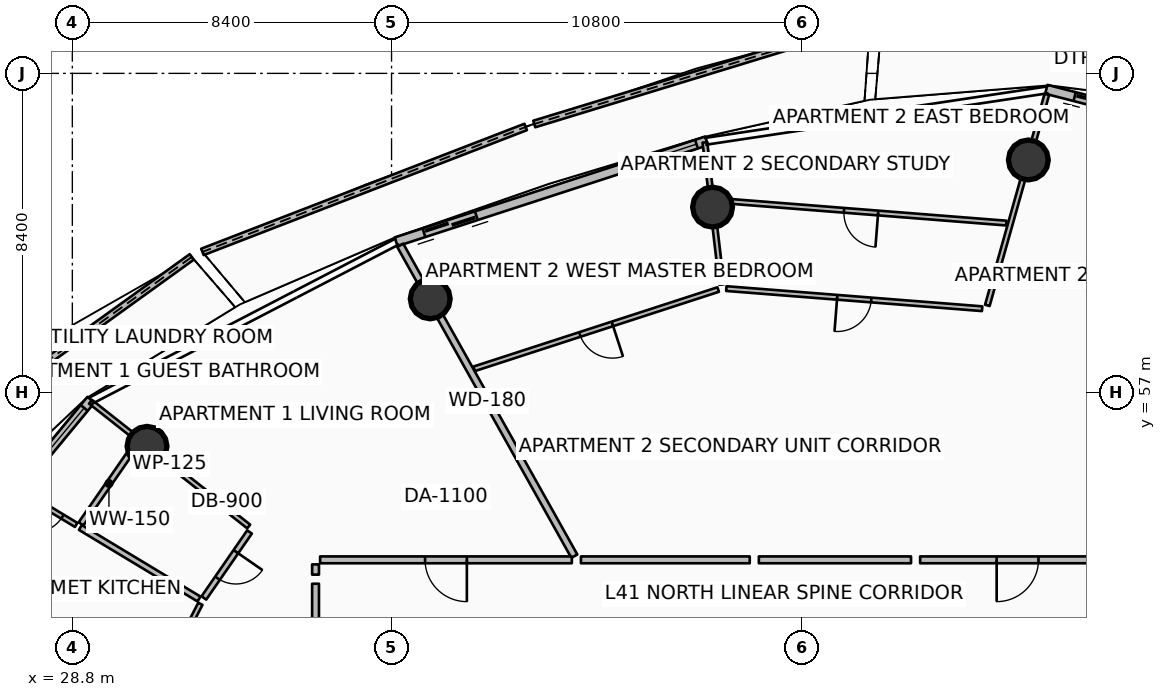
"""IFC4 building model, lengths in metres.
Left out: names, types, materials, properties, quantities, classifications, styles, units other than length and angle.
Written with IfcOpenShell. Run it as: python <this file> out.ifc"""

import sys

from ifc_helpers import new_model, si_unit, direction, frame, frame_2d, origin, origin_2d, place, context, subcontext, project, spatial, polyline, rectangle, circle, outline, extrude, element, fill, save


model = new_model("IFC4")
c1 = context("Model", 3, precision=1e-05, world=origin(), true_north=direction((0.0, 1.0)))
c2 = subcontext(c1, "Body", "Model", "MODEL_VIEW")
j1 = project(units=[si_unit("LENGTHUNIT", "METRE"), si_unit("PLANEANGLEUNIT", "RADIAN")], contexts=[c1])
p1 = place(None, origin())
s1 = spatial("IfcSite", under=j1, at=p1, CompositionType="ELEMENT")
p2 = place(p1, origin())
s2 = spatial("IfcBuilding", under=s1, at=p2, CompositionType="ELEMENT")
p3 = place(p2, frame((0.0, 0.0, 165.3)))
s3 = spatial("IfcBuildingStorey", under=s2, at=p3, CompositionType="ELEMENT", Elevation=165.3)
for number, where, z_axis, x_axis in (
    (1, (53.957, 63.122, 0.0), (0.0, 0.0, 1.0), (1.0, 0.0, 0.0)),
    (2, (45.647, 61.881, 0.0), (0.0, 0.0, 1.0), (1.0, 0.0, 0.0)),
    (3, (38.218, 59.467, 0.0), (0.0, 0.0, 1.0), (1.0, 0.0, 0.0)),
    (4, (30.766, 55.586, 0.0), (0.0, 0.0, 1.0), (1.0, 0.0, 0.0)),
):
    element("IfcColumn", number, at=place(p3, frame(where, z_axis=z_axis, x_axis=x_axis)), inside=s3, PredefinedType="COLUMN", context=c2, shape_type="SweptSolid", body=[
        extrude(circle(Radius=0.525, at=origin_2d()), origin(), (0.0, 0.0, 1.0), 3.5),
    ])
p4 = place(p3, frame((49.797, 66.768, 0.0), z_axis=(0.0, 0.0, 1.0), x_axis=(-0.956413465024, -0.292015896691, 0.0)))
e5 = element("IfcWall", 5, at=p4, inside=s3, PredefinedType="PARAPET", context=c2, shape_type="SweptSolid", body=[
    extrude(outline(polyline([(0.0, 0.0), (9.244, 0.0), (9.244, 1.148), (4.622, 1.284), (0.0, 1.483), (0.0, 0.0)])), frame((0.0, 0.09, 0.0), z_axis=(0.0, -1.0, 0.0), x_axis=(1.0, 0.0, 0.0)), (0.0, 0.0, 1.0), 0.18),
])
p5 = place(p3, frame((40.729, 63.99, 0.0), z_axis=(0.0, 0.0, 1.0), x_axis=(-0.932748827034, -0.360526872322, 0.0)))
e6 = element("IfcWall", 6, at=p5, inside=s3, PredefinedType="PARAPET", context=c2, shape_type="SweptSolid", body=[
    extrude(outline(polyline([(0.0, 0.0), (9.119, 0.0), (9.119, 1.224), (4.56, 1.127), (0.0, 1.148), (0.0, 0.0)])), frame((0.0, 0.09, 0.0), z_axis=(0.0, -1.0, 0.0), x_axis=(1.0, 0.0, 0.0)), (0.0, 0.0, 1.0), 0.18),
])
p6 = place(p3, frame((31.942, 60.57, 0.0), z_axis=(0.0, 0.0, 1.0), x_axis=(-0.811363748486, -0.584541587608, 0.0)))
e7 = element("IfcWall", 7, at=p6, inside=s3, PredefinedType="PARAPET", context=c2, shape_type="SweptSolid", body=[
    extrude(outline(polyline([(0.0, 0.0), (10.29, 0.0), (10.29, 1.632), (5.145, 1.418), (0.0, 1.233), (0.0, 0.0)])), frame((0.0, 0.09, 0.0), z_axis=(0.0, -1.0, 0.0), x_axis=(1.0, 0.0, 0.0)), (0.0, 0.0, 1.0), 0.18),
])
p7 = place(p3, frame((64.192, 62.466, 0.0), z_axis=(0.0, 0.0, 1.0), x_axis=(-0.968379685126, 0.249481032214, 0.0)))
e8 = element("IfcWall", 8, at=p7, inside=s3, PredefinedType="SOLIDWALL", context=c2, shape_type="SweptSolid", body=[
    extrude(rectangle(XDim=10.082, YDim=0.24, at=frame_2d((5.041, 0.0))), origin(), (0.0, 0.0, 1.0), 2.45),
])
p8 = place(p7, frame((7.862, 0.0, 0.0)))
e9 = element("IfcOpeningElement", 9, at=p8, cuts=e8, PredefinedType="OPENING", context=c2, shape_type="SweptSolid", body=[
    extrude(rectangle(XDim=1.45, YDim=2.15, at=frame_2d((0.725, 1.075))), frame((0.0, 0.13, 0.0), z_axis=(0.0, -1.0, 0.0), x_axis=(1.0, 0.0, 0.0)), (0.0, 0.0, 1.0), 0.26),
])
p9 = place(p7, frame((0.28, 0.0, 0.65)))
e10 = element("IfcOpeningElement", 10, at=p9, cuts=e8, PredefinedType="OPENING", context=c2, shape_type="SweptSolid", body=[
    extrude(rectangle(XDim=1.6, YDim=1.5, at=frame_2d((0.8, 0.75))), frame((0.0, 0.13, 0.0), z_axis=(0.0, -1.0, 0.0), x_axis=(1.0, 0.0, 0.0)), (0.0, 0.0, 1.0), 0.26),
])
p10 = place(p3, frame((45.49, 63.624, 0.0), z_axis=(0.0, 0.0, 1.0), x_axis=(-0.951046390632, -0.309048156224, 0.0)))
e11 = element("IfcWall", 11, at=p10, inside=s3, PredefinedType="SOLIDWALL", context=c2, shape_type="SweptSolid", body=[
    extrude(rectangle(XDim=8.59, YDim=0.24, at=frame_2d((4.295, 0.0))), origin(), (0.0, 0.0, 1.0), 2.45),
])
p11 = place(p10, frame((6.37, 0.0, 0.0)))
e12 = element("IfcOpeningElement", 12, at=p11, cuts=e11, PredefinedType="OPENING", context=c2, shape_type="SweptSolid", body=[
    extrude(rectangle(XDim=1.45, YDim=2.15, at=frame_2d((0.725, 1.075))), frame((0.0, 0.13, 0.0), z_axis=(0.0, -1.0, 0.0), x_axis=(1.0, 0.0, 0.0)), (0.0, 0.0, 1.0), 0.26),
])
p12 = place(p10, frame((0.28, 0.0, 0.65)))
e13 = element("IfcOpeningElement", 13, at=p12, cuts=e11, PredefinedType="OPENING", context=c2, shape_type="SweptSolid", body=[
    extrude(rectangle(XDim=1.6, YDim=1.5, at=frame_2d((0.8, 0.75))), frame((0.0, 0.13, 0.0), z_axis=(0.0, -1.0, 0.0), x_axis=(1.0, 0.0, 0.0)), (0.0, 0.0, 1.0), 0.26),
])
p13 = place(p3, frame((29.291, 56.813, 0.0), z_axis=(0.0, 0.0, 1.0), x_axis=(-0.636771922292, -0.77105221547, 0.0)))
e14 = element("IfcWall", 14, at=p13, inside=s3, PredefinedType="SOLIDWALL", context=c2, shape_type="SweptSolid", body=[
    extrude(rectangle(XDim=10.082, YDim=0.24, at=frame_2d((5.041, 0.0))), origin(), (0.0, 0.0, 1.0), 2.45),
])
p14 = place(p13, frame((7.862, 0.0, 0.0)))
e15 = element("IfcOpeningElement", 15, at=p14, cuts=e14, PredefinedType="OPENING", context=c2, shape_type="SweptSolid", body=[
    extrude(rectangle(XDim=1.45, YDim=2.15, at=frame_2d((0.725, 1.075))), frame((0.0, 0.13, 0.0), z_axis=(0.0, -1.0, 0.0), x_axis=(1.0, 0.0, 0.0)), (0.0, 0.0, 1.0), 0.26),
])
p15 = place(p13, frame((0.28, 0.0, 0.65)))
e16 = element("IfcOpeningElement", 16, at=p15, cuts=e14, PredefinedType="OPENING", context=c2, shape_type="SweptSolid", body=[
    extrude(rectangle(XDim=1.6, YDim=1.5, at=frame_2d((0.8, 0.75))), frame((0.0, 0.13, 0.0), z_axis=(0.0, -1.0, 0.0), x_axis=(1.0, 0.0, 0.0)), (0.0, 0.0, 1.0), 0.26),
])
p16 = place(p3, frame((42.01, 52.696, 0.0), z_axis=(0.0, 0.0, 1.0), x_axis=(-0.488627157427, 0.872492693967, 0.0)))
e17 = element("IfcWall", 17, at=p16, inside=s3, PredefinedType="PARTITIONING", context=c2, shape_type="SweptSolid", body=[
    extrude(rectangle(XDim=9.375, YDim=0.18, at=frame_2d((4.688, 0.0))), origin(), (0.0, 0.0, 1.0), 2.94),
])
p17 = place(p3, frame((41.944, 52.6, 0.0), z_axis=(0.0, 0.0, 1.0), x_axis=(-1.0, 0.0, 0.0)))
e18 = element("IfcWall", 18, at=p17, inside=s3, PredefinedType="PARTITIONING", context=c2, shape_type="SweptSolid", body=[
    extrude(rectangle(XDim=6.624, YDim=0.18, at=frame_2d((3.312, 0.0))), origin(), (0.0, 0.0, 1.0), 2.94),
])
p18 = place(p17, frame((2.762, 0.0, 0.0)))
e19 = element("IfcOpeningElement", 19, at=p18, cuts=e18, PredefinedType="OPENING", context=c2, shape_type="SweptSolid", body=[
    extrude(rectangle(XDim=1.1, YDim=2.1, at=frame_2d((0.55, 1.05))), frame((0.0, 0.1, 0.0), z_axis=(0.0, -1.0, 0.0), x_axis=(1.0, 0.0, 0.0)), (0.0, 0.0, 1.0), 0.2),
])
p19 = place(p3, frame((35.2, 52.48, 0.0), z_axis=(0.0, 0.0, 1.0), x_axis=(0.0, -1.0, 0.0)))
e20 = element("IfcWall", 20, at=p19, inside=s3, PredefinedType="PARTITIONING", context=c2, shape_type="SweptSolid", body=[
    extrude(rectangle(XDim=0.269, YDim=0.18, at=frame_2d((0.135, 0.0))), origin(), (0.0, 0.0, 1.0), 2.94),
])
p20 = place(p3, frame((35.2, 51.971, 0.0), z_axis=(0.0, 0.0, 1.0), x_axis=(0.0, -1.0, 0.0)))
e21 = element("IfcWall", 21, at=p20, inside=s3, PredefinedType="PARTITIONING", context=c2, shape_type="SweptSolid", body=[
    extrude(rectangle(XDim=6.241, YDim=0.18, at=frame_2d((3.12, 0.0))), origin(), (0.0, 0.0, 1.0), 2.94),
])
p21 = place(p3, frame((33.441, 53.477, 0.0), z_axis=(0.0, 0.0, 1.0), x_axis=(-0.785319981095, 0.619090080112, 0.0)))
e22 = element("IfcWall", 22, at=p21, inside=s3, PredefinedType="PARTITIONING", context=c2, shape_type="SweptSolid", body=[
    extrude(rectangle(XDim=5.301, YDim=0.125, at=frame_2d((2.65, 0.0))), origin(), (0.0, 0.0, 1.0), 2.94),
])
p22 = place(p3, frame((33.463, 53.333, 0.0), z_axis=(0.0, 0.0, 1.0), x_axis=(-0.568843105688, -0.822446059697, 0.0)))
e23 = element("IfcWall", 23, at=p22, inside=s3, PredefinedType="PARTITIONING", context=c2, shape_type="SweptSolid", body=[
    extrude(rectangle(XDim=2.111, YDim=0.15, at=frame_2d((1.056, 0.0))), origin(), (0.0, 0.0, 1.0), 2.94),
])
p23 = place(p22, frame((0.631, 0.0, 0.0)))
e24 = element("IfcOpeningElement", 24, at=p23, cuts=e23, PredefinedType="OPENING", context=c2, shape_type="SweptSolid", body=[
    extrude(rectangle(XDim=0.85, YDim=2.06, at=frame_2d((0.425, 1.03))), frame((0.0, 0.085, 0.0), z_axis=(0.0, -1.0, 0.0), x_axis=(1.0, 0.0, 0.0)), (0.0, 0.0, 1.0), 0.17),
])
p24 = place(p3, frame((30.498, 55.67, 0.0), z_axis=(0.0, 0.0, 1.0), x_axis=(-0.56886579211, -0.822430368218, 0.0)))
e25 = element("IfcWall", 25, at=p24, inside=s3, PredefinedType="PARTITIONING", context=c2, shape_type="SweptSolid", body=[
    extrude(rectangle(XDim=2.582, YDim=0.15, at=frame_2d((1.291, 0.0))), origin(), (0.0, 0.0, 1.0), 2.94),
])
p25 = place(p3, frame((32.133, 51.57, 0.0), z_axis=(0.0, 0.0, 1.0), x_axis=(-0.856320461768, 0.516444834186, 0.0)))
e26 = element("IfcWall", 26, at=p25, inside=s3, PredefinedType="PARTITIONING", context=c2, shape_type="SweptSolid", body=[
    extrude(rectangle(XDim=3.645, YDim=0.15, at=frame_2d((1.822, 0.0))), origin(), (0.0, 0.0, 1.0), 2.94),
])
p26 = place(p3, frame((28.901, 53.519, 0.0), z_axis=(0.0, 0.0, 1.0), x_axis=(-0.856306503803, 0.516467977269, 0.0)))
e27 = element("IfcWall", 27, at=p26, inside=s3, PredefinedType="PARTITIONING", context=c2, shape_type="SweptSolid", body=[
    extrude(rectangle(XDim=1.692, YDim=0.125, at=frame_2d((0.846, 0.0))), origin(), (0.0, 0.0, 1.0), 2.94),
])
p27 = place(p26, frame((0.421, 0.0, 0.0)))
e28 = element("IfcOpeningElement", 28, at=p27, cuts=e27, PredefinedType="OPENING", context=c2, shape_type="SweptSolid", body=[
    extrude(rectangle(XDim=0.85, YDim=2.06, at=frame_2d((0.425, 1.03))), frame((0.0, 0.073, 0.0), z_axis=(0.0, -1.0, 0.0), x_axis=(1.0, 0.0, 0.0)), (0.0, 0.0, 1.0), 0.145),
])
p28 = place(p3, frame((30.998, 49.365, 0.0), z_axis=(0.0, 0.0, 1.0), x_axis=(-0.917591640713, 0.397524314845, 0.0)))
e29 = element("IfcWall", 29, at=p28, inside=s3, PredefinedType="PARTITIONING", context=c2, shape_type="SweptSolid", body=[
    extrude(rectangle(XDim=6.182, YDim=0.125, at=frame_2d((3.091, 0.0))), origin(), (0.0, 0.0, 1.0), 2.94),
])
p29 = place(p3, frame((32.169, 51.443, 0.0), z_axis=(0.0, 0.0, 1.0), x_axis=(-0.458020211203, -0.888941778819, 0.0)))
e30 = element("IfcWall", 30, at=p29, inside=s3, PredefinedType="PARTITIONING", context=c2, shape_type="SweptSolid", body=[
    extrude(rectangle(XDim=2.297, YDim=0.125, at=frame_2d((1.149, 0.0))), origin(), (0.0, 0.0, 1.0), 2.94),
])
p30 = place(p29, frame((0.724, 0.0, 0.0)))
e31 = element("IfcOpeningElement", 31, at=p30, cuts=e30, PredefinedType="OPENING", context=c2, shape_type="SweptSolid", body=[
    extrude(rectangle(XDim=0.85, YDim=2.06, at=frame_2d((0.425, 1.03))), frame((0.0, 0.073, 0.0), z_axis=(0.0, -1.0, 0.0), x_axis=(1.0, 0.0, 0.0)), (0.0, 0.0, 1.0), 0.145),
])
p31 = place(p3, frame((56.236, 52.6, 0.0), z_axis=(0.0, 0.0, 1.0), x_axis=(-1.0, 0.0, 0.0)))
e32 = element("IfcWall", 32, at=p31, inside=s3, PredefinedType="PARTITIONING", context=c2, shape_type="SweptSolid", body=[
    extrude(rectangle(XDim=5.127, YDim=0.18, at=frame_2d((2.563, 0.0))), origin(), (0.0, 0.0, 1.0), 2.94),
])
p32 = place(p31, frame((2.013, 0.0, 0.0)))
e33 = element("IfcOpeningElement", 33, at=p32, cuts=e32, PredefinedType="OPENING", context=c2, shape_type="SweptSolid", body=[
    extrude(rectangle(XDim=1.1, YDim=2.1, at=frame_2d((0.55, 1.05))), frame((0.0, 0.1, 0.0), z_axis=(0.0, -1.0, 0.0), x_axis=(1.0, 0.0, 0.0)), (0.0, 0.0, 1.0), 0.2),
])
p33 = place(p3, frame((50.869, 52.6, 0.0), z_axis=(0.0, 0.0, 1.0), x_axis=(-1.0, 0.0, 0.0)))
e34 = element("IfcWall", 34, at=p33, inside=s3, PredefinedType="PARTITIONING", context=c2, shape_type="SweptSolid", body=[
    extrude(rectangle(XDim=4.004, YDim=0.18, at=frame_2d((2.002, 0.0))), origin(), (0.0, 0.0, 1.0), 2.94),
])
p34 = place(p3, frame((52.878, 59.295, 0.0), z_axis=(0.0, 0.0, 1.0), x_axis=(0.271461170106, 0.962449392501, 0.0)))
e35 = element("IfcWall", 35, at=p34, inside=s3, PredefinedType="PARTITIONING", context=c2, shape_type="SweptSolid", body=[
    extrude(rectangle(XDim=5.769, YDim=0.125, at=frame_2d((2.885, 0.0))), origin(), (0.0, 0.0, 1.0), 2.94),
])
p35 = place(p3, frame((52.741, 59.208, 0.0), z_axis=(0.0, 0.0, 1.0), x_axis=(-0.996917452966, 0.078457580711, 0.0)))
e36 = element("IfcWall", 36, at=p35, inside=s3, PredefinedType="PARTITIONING", context=c2, shape_type="SweptSolid", body=[
    extrude(rectangle(XDim=6.752, YDim=0.125, at=frame_2d((3.376, 0.0))), origin(), (0.0, 0.0, 1.0), 2.94),
])
p36 = place(p35, frame((2.926, 0.0, 0.0)))
e37 = element("IfcOpeningElement", 37, at=p36, cuts=e36, PredefinedType="OPENING", context=c2, shape_type="SweptSolid", body=[
    extrude(rectangle(XDim=0.9, YDim=2.08, at=frame_2d((0.45, 1.04))), frame((0.0, 0.073, 0.0), z_axis=(0.0, -1.0, 0.0), x_axis=(1.0, 0.0, 0.0)), (0.0, 0.0, 1.0), 0.145),
])
p37 = place(p3, frame((53.376, 61.461, 0.0), z_axis=(0.0, 0.0, 1.0), x_axis=(-0.996916336075, 0.078471771143, 0.0)))
e38 = element("IfcWall", 38, at=p37, inside=s3, PredefinedType="PARTITIONING", context=c2, shape_type="SweptSolid", body=[
    extrude(rectangle(XDim=7.666, YDim=0.125, at=frame_2d((3.833, 0.0))), origin(), (0.0, 0.0, 1.0), 2.94),
])
p38 = place(p37, frame((3.383, 0.0, 0.0)))
e39 = element("IfcOpeningElement", 39, at=p38, cuts=e38, PredefinedType="OPENING", context=c2, shape_type="SweptSolid", body=[
    extrude(rectangle(XDim=0.9, YDim=2.08, at=frame_2d((0.45, 1.04))), frame((0.0, 0.073, 0.0), z_axis=(0.0, -1.0, 0.0), x_axis=(1.0, 0.0, 0.0)), (0.0, 0.0, 1.0), 0.145),
])
p39 = place(p3, frame((46.625, 52.6, 0.0), z_axis=(0.0, 0.0, 1.0), x_axis=(-1.0, 0.0, 0.0)))
e40 = element("IfcWall", 40, at=p39, inside=s3, PredefinedType="PARTITIONING", context=c2, shape_type="SweptSolid", body=[
    extrude(rectangle(XDim=4.442, YDim=0.18, at=frame_2d((2.221, 0.0))), origin(), (0.0, 0.0, 1.0), 2.94),
])
p40 = place(p3, frame((45.888, 59.845, 0.0), z_axis=(0.0, 0.0, 1.0), x_axis=(-0.117510984651, 0.99307158276, 0.0)))
e41 = element("IfcWall", 41, at=p40, inside=s3, PredefinedType="PARTITIONING", context=c2, shape_type="SweptSolid", body=[
    extrude(rectangle(XDim=3.765, YDim=0.125, at=frame_2d((1.882, 0.0))), origin(), (0.0, 0.0, 1.0), 2.94),
])
p41 = place(p3, frame((45.795, 59.712, 0.0), z_axis=(0.0, 0.0, 1.0), x_axis=(-0.951056650279, -0.309016582016, 0.0)))
e42 = element("IfcWall", 42, at=p41, inside=s3, PredefinedType="PARTITIONING", context=c2, shape_type="SweptSolid", body=[
    extrude(rectangle(XDim=6.753, YDim=0.125, at=frame_2d((3.376, 0.0))), origin(), (0.0, 0.0, 1.0), 2.94),
])
p42 = place(p41, frame((2.926, 0.0, 0.0)))
e43 = element("IfcOpeningElement", 43, at=p42, cuts=e42, PredefinedType="OPENING", context=c2, shape_type="SweptSolid", body=[
    extrude(rectangle(XDim=0.9, YDim=2.08, at=frame_2d((0.45, 1.04))), frame((0.0, 0.073, 0.0), z_axis=(0.0, -1.0, 0.0), x_axis=(1.0, 0.0, 0.0)), (0.0, 0.0, 1.0), 0.145),
])
p43 = place(p8, origin())
e44 = element("IfcDoor", 44, at=p43, inside=s3, OperationType="DOUBLE_DOOR_SLIDING", PredefinedType="DOOR", context=c2, shape_type="SweptSolid", body=[
    extrude(rectangle(XDim=1.45, YDim=2.15, at=frame_2d((0.725, 1.075))), frame((0.0, 0.025, 0.0), z_axis=(0.0, -1.0, 0.0), x_axis=(1.0, 0.0, 0.0)), (0.0, 0.0, 1.0), 0.05),
])
fill(e9, e44)
p44 = place(p11, origin())
e45 = element("IfcDoor", 45, at=p44, inside=s3, OperationType="DOUBLE_DOOR_SLIDING", PredefinedType="DOOR", context=c2, shape_type="SweptSolid", body=[
    extrude(rectangle(XDim=1.45, YDim=2.15, at=frame_2d((0.725, 1.075))), frame((0.0, 0.025, 0.0), z_axis=(0.0, -1.0, 0.0), x_axis=(1.0, 0.0, 0.0)), (0.0, 0.0, 1.0), 0.05),
])
fill(e12, e45)
p45 = place(p12, origin())
e46 = element("IfcWindow", 46, at=p45, inside=s3, PartitioningType="SINGLE_PANEL", PredefinedType="WINDOW", context=c2, shape_type="SweptSolid", body=[
    extrude(rectangle(XDim=1.6, YDim=1.5, at=frame_2d((0.8, 0.75))), frame((0.0, 0.03, 0.0), z_axis=(0.0, -1.0, 0.0), x_axis=(1.0, 0.0, 0.0)), (0.0, 0.0, 1.0), 0.06),
])
fill(e13, e46)
p46 = place(p15, origin())
e47 = element("IfcWindow", 47, at=p46, inside=s3, PartitioningType="SINGLE_PANEL", PredefinedType="WINDOW", context=c2, shape_type="SweptSolid", body=[
    extrude(rectangle(XDim=1.6, YDim=1.5, at=frame_2d((0.8, 0.75))), frame((0.0, 0.03, 0.0), z_axis=(0.0, -1.0, 0.0), x_axis=(1.0, 0.0, 0.0)), (0.0, 0.0, 1.0), 0.06),
])
fill(e16, e47)
p47 = place(p18, origin())
e48 = element("IfcDoor", 48, at=p47, inside=s3, OperationType="SINGLE_SWING_LEFT", PredefinedType="DOOR", context=c2, shape_type="SweptSolid", body=[
    extrude(rectangle(XDim=1.1, YDim=2.1, at=frame_2d((0.55, 1.05))), frame((0.0, 0.025, 0.0), z_axis=(0.0, -1.0, 0.0), x_axis=(1.0, 0.0, 0.0)), (0.0, 0.0, 1.0), 0.05),
])
fill(e19, e48)
p48 = place(p23, origin())
e49 = element("IfcDoor", 49, at=p48, inside=s3, OperationType="SINGLE_SWING_LEFT", PredefinedType="DOOR", context=c2, shape_type="SweptSolid", body=[
    extrude(rectangle(XDim=0.85, YDim=2.06, at=frame_2d((0.425, 1.03))), frame((0.0, 0.025, 0.0), z_axis=(0.0, -1.0, 0.0), x_axis=(1.0, 0.0, 0.0)), (0.0, 0.0, 1.0), 0.05),
])
fill(e24, e49)
p49 = place(p27, origin())
e50 = element("IfcDoor", 50, at=p49, inside=s3, OperationType="SINGLE_SWING_RIGHT", PredefinedType="DOOR", context=c2, shape_type="SweptSolid", body=[
    extrude(rectangle(XDim=0.85, YDim=2.06, at=frame_2d((0.425, 1.03))), frame((0.0, 0.025, 0.0), z_axis=(0.0, -1.0, 0.0), x_axis=(1.0, 0.0, 0.0)), (0.0, 0.0, 1.0), 0.05),
])
fill(e28, e50)
p50 = place(p32, origin())
e51 = element("IfcDoor", 51, at=p50, inside=s3, OperationType="SINGLE_SWING_RIGHT", PredefinedType="DOOR", context=c2, shape_type="SweptSolid", body=[
    extrude(rectangle(XDim=1.1, YDim=2.1, at=frame_2d((0.55, 1.05))), frame((0.0, 0.025, 0.0), z_axis=(0.0, -1.0, 0.0), x_axis=(1.0, 0.0, 0.0)), (0.0, 0.0, 1.0), 0.05),
])
fill(e33, e51)
p51 = place(p36, origin())
e52 = element("IfcDoor", 52, at=p51, inside=s3, OperationType="SINGLE_SWING_RIGHT", PredefinedType="DOOR", context=c2, shape_type="SweptSolid", body=[
    extrude(rectangle(XDim=0.9, YDim=2.08, at=frame_2d((0.45, 1.04))), frame((0.0, 0.025, 0.0), z_axis=(0.0, -1.0, 0.0), x_axis=(1.0, 0.0, 0.0)), (0.0, 0.0, 1.0), 0.05),
])
fill(e37, e52)
p52 = place(p38, origin())
e53 = element("IfcDoor", 53, at=p52, inside=s3, OperationType="SINGLE_SWING_LEFT", PredefinedType="DOOR", context=c2, shape_type="SweptSolid", body=[
    extrude(rectangle(XDim=0.9, YDim=2.08, at=frame_2d((0.45, 1.04))), frame((0.0, 0.025, 0.0), z_axis=(0.0, -1.0, 0.0), x_axis=(1.0, 0.0, 0.0)), (0.0, 0.0, 1.0), 0.05),
])
fill(e39, e53)
p53 = place(p42, origin())
e54 = element("IfcDoor", 54, at=p53, inside=s3, OperationType="SINGLE_SWING_LEFT", PredefinedType="DOOR", context=c2, shape_type="SweptSolid", body=[
    extrude(rectangle(XDim=0.9, YDim=2.08, at=frame_2d((0.45, 1.04))), frame((0.0, 0.025, 0.0), z_axis=(0.0, -1.0, 0.0), x_axis=(1.0, 0.0, 0.0)), (0.0, 0.0, 1.0), 0.05),
])
fill(e43, e54)
save(model, sys.argv[1])
